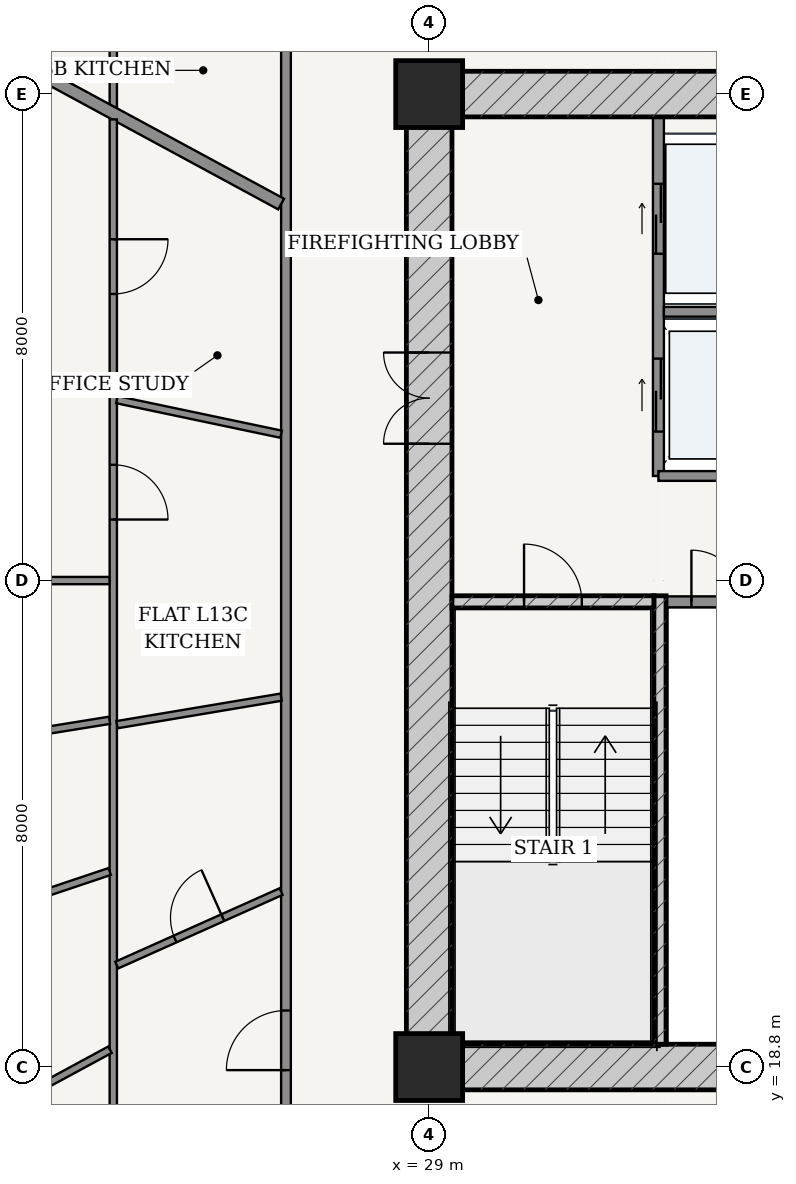
"""IFC4 building model, lengths in metres.
Left out: names, types, materials, properties, quantities, classifications, styles, units other than length and angle.
Written with IfcOpenShell. Run it as: python <this file> out.ifc"""

import sys

from ifc_helpers import new_model, si_unit, direction, frame, frame_2d, origin, origin_2d, place, context, subcontext, project, spatial, rectangle, extrude, source, transform, mapped, element, fill, save


model = new_model("IFC4")
c1 = context("Model", 3, precision=1e-05, world=origin(), true_north=direction((-0.2419218956, 0.970295726276)))
c2 = subcontext(c1, "Body", "Model", "MODEL_VIEW")
j1 = project(units=[si_unit("LENGTHUNIT", "METRE"), si_unit("PLANEANGLEUNIT", "RADIAN")], contexts=[c1])
p1 = place(None, origin())
s1 = spatial("IfcSite", under=j1, at=p1, CompositionType="ELEMENT")
p2 = place(p1, origin())
s2 = spatial("IfcBuilding", under=s1, at=p2, CompositionType="ELEMENT")
p3 = place(p2, frame((0.0, 0.0, 52.8)))
s3 = spatial("IfcBuildingStorey", under=s2, at=p3, CompositionType="ELEMENT", Elevation=52.8)
for number, where, z_axis, x_axis in (
    (1, (29.0, 18.8, 0.0), (0.0, 0.0, 1.0), (1.0, 0.0, 0.0)),
    (2, (29.0, 34.8, 0.0), (0.0, 0.0, 1.0), (1.0, 0.0, 0.0)),
):
    element("IfcColumn", number, at=place(p3, frame(where, z_axis=z_axis, x_axis=x_axis)), inside=s3, PredefinedType="COLUMN", context=c2, shape_type="SweptSolid", body=[
        extrude(rectangle(XDim=1.1, YDim=1.1, at=origin_2d()), origin(), (0.0, 0.0, 1.0), 3.6),
    ])
p4 = place(p3, frame((28.625, 18.8, 0.0), z_axis=(0.0, 0.0, 1.0), x_axis=(1.0, 0.0, 0.0)))
e3 = element("IfcWall", 3, at=p4, inside=s3, PredefinedType="SHEAR", context=c2, shape_type="SweptSolid", body=[
    extrude(rectangle(XDim=18.75, YDim=0.75, at=frame_2d((9.375, 0.0))), origin(), (0.0, 0.0, 1.0), 3.32),
])
p5 = place(p4, frame((7.627, 0.0, 0.0)))
e4 = element("IfcOpeningElement", 4, at=p5, cuts=e3, PredefinedType="OPENING", context=c2, shape_type="SweptSolid", body=[
    extrude(rectangle(XDim=0.85, YDim=2.1, at=frame_2d((0.425, 1.05))), frame((0.0, 0.385, 0.0), z_axis=(0.0, -1.0, 0.0), x_axis=(1.0, 0.0, 0.0)), (0.0, 0.0, 1.0), 0.77),
])
p6 = place(p4, frame((10.673, 0.0, 0.0)))
e5 = element("IfcOpeningElement", 5, at=p6, cuts=e3, PredefinedType="OPENING", context=c2, shape_type="SweptSolid", body=[
    extrude(rectangle(XDim=0.85, YDim=2.1, at=frame_2d((0.425, 1.05))), frame((0.0, 0.385, 0.0), z_axis=(0.0, -1.0, 0.0), x_axis=(1.0, 0.0, 0.0)), (0.0, 0.0, 1.0), 0.77),
])
p7 = place(p3, frame((28.625, 34.8, 0.0), z_axis=(0.0, 0.0, 1.0), x_axis=(1.0, 0.0, 0.0)))
e6 = element("IfcWall", 6, at=p7, inside=s3, PredefinedType="SHEAR", context=c2, shape_type="SweptSolid", body=[
    extrude(rectangle(XDim=18.75, YDim=0.75, at=frame_2d((9.375, 0.0))), origin(), (0.0, 0.0, 1.0), 3.32),
])
p8 = place(p7, frame((6.887, 0.0, 0.0)))
e7 = element("IfcOpeningElement", 7, at=p8, cuts=e6, PredefinedType="OPENING", context=c2, shape_type="SweptSolid", body=[
    extrude(rectangle(XDim=0.85, YDim=2.1, at=frame_2d((0.425, 1.05))), frame((0.0, 0.385, 0.0), z_axis=(0.0, -1.0, 0.0), x_axis=(1.0, 0.0, 0.0)), (0.0, 0.0, 1.0), 0.77),
])
p9 = place(p7, frame((8.945, 0.0, 0.0)))
e8 = element("IfcOpeningElement", 8, at=p9, cuts=e6, PredefinedType="OPENING", context=c2, shape_type="SweptSolid", body=[
    extrude(rectangle(XDim=0.86, YDim=2.1, at=frame_2d((0.43, 1.05))), frame((0.0, 0.385, 0.0), z_axis=(0.0, -1.0, 0.0), x_axis=(1.0, 0.0, 0.0)), (0.0, 0.0, 1.0), 0.77),
])
p10 = place(p7, frame((11.012, 0.0, 0.0)))
e9 = element("IfcOpeningElement", 9, at=p10, cuts=e6, PredefinedType="OPENING", context=c2, shape_type="SweptSolid", body=[
    extrude(rectangle(XDim=0.85, YDim=2.1, at=frame_2d((0.425, 1.05))), frame((0.0, 0.385, 0.0), z_axis=(0.0, -1.0, 0.0), x_axis=(1.0, 0.0, 0.0)), (0.0, 0.0, 1.0), 0.77),
])
p11 = place(p3, frame((29.0, 19.175, 0.0), z_axis=(0.0, 0.0, 1.0), x_axis=(0.0, 1.0, 0.0)))
e10 = element("IfcWall", 10, at=p11, inside=s3, PredefinedType="SHEAR", context=c2, shape_type="SweptSolid", body=[
    extrude(rectangle(XDim=15.25, YDim=0.75, at=frame_2d((7.625, 0.0))), origin(), (0.0, 0.0, 1.0), 3.32),
])
p12 = place(p11, frame((9.875, 0.0, 0.0)))
e11 = element("IfcOpeningElement", 11, at=p12, cuts=e10, PredefinedType="OPENING", context=c2, shape_type="SweptSolid", body=[
    extrude(rectangle(XDim=1.5, YDim=2.2, at=frame_2d((0.75, 1.1))), frame((0.0, 0.385, 0.0), z_axis=(0.0, -1.0, 0.0), x_axis=(1.0, 0.0, 0.0)), (0.0, 0.0, 1.0), 0.77),
])
p13 = place(p3, frame((32.795, 19.175, 0.0), z_axis=(0.0, 0.0, 1.0), x_axis=(0.0, 1.0, 0.0)))
e12 = element("IfcWall", 12, at=p13, inside=s3, PredefinedType="SOLIDWALL", context=c2, shape_type="SweptSolid", body=[
    extrude(rectangle(XDim=7.375, YDim=0.2, at=frame_2d((3.688, 0.0))), origin(), (0.0, 0.0, 1.0), 3.32),
])
p14 = place(p3, frame((29.375, 26.45, 0.0), z_axis=(0.0, 0.0, 1.0), x_axis=(1.0, 0.0, 0.0)))
e13 = element("IfcWall", 13, at=p14, inside=s3, PredefinedType="SOLIDWALL", context=c2, shape_type="SweptSolid", body=[
    extrude(rectangle(XDim=3.32, YDim=0.2, at=frame_2d((1.66, 0.0))), origin(), (0.0, 0.0, 1.0), 3.32),
])
p15 = place(p14, frame((1.185, 0.0, 0.0)))
e14 = element("IfcOpeningElement", 14, at=p15, cuts=e13, PredefinedType="OPENING", context=c2, shape_type="SweptSolid", body=[
    extrude(rectangle(XDim=0.95, YDim=2.15, at=frame_2d((0.475, 1.075))), frame((0.0, 0.11, 0.0), z_axis=(0.0, -1.0, 0.0), x_axis=(1.0, 0.0, 0.0)), (0.0, 0.0, 1.0), 0.22),
])
p16 = place(p3, frame((32.9, 26.45, 0.0), z_axis=(0.0, 0.0, 1.0), x_axis=(1.0, 0.0, 0.0)))
e15 = element("IfcWall", 15, at=p16, inside=s3, PredefinedType="PARTITIONING", context=c2, shape_type="SweptSolid", body=[
    extrude(rectangle(XDim=1.675, YDim=0.18, at=frame_2d((0.837, 0.0))), origin(), (0.0, 0.0, 1.0), 3.32),
])
p17 = place(p16, frame((0.413, 0.0, 0.0)))
e16 = element("IfcOpeningElement", 16, at=p17, cuts=e15, PredefinedType="OPENING", context=c2, shape_type="SweptSolid", body=[
    extrude(rectangle(XDim=0.85, YDim=2.1, at=frame_2d((0.425, 1.05))), frame((0.0, 0.1, 0.0), z_axis=(0.0, -1.0, 0.0), x_axis=(1.0, 0.0, 0.0)), (0.0, 0.0, 1.0), 0.2),
])
p18 = place(p3, frame((32.77, 28.52, 0.0), z_axis=(0.0, 0.0, 1.0), x_axis=(0.0, 1.0, 0.0)))
e17 = element("IfcWall", 17, at=p18, inside=s3, PredefinedType="PARTITIONING", context=c2, shape_type="SweptSolid", body=[
    extrude(rectangle(XDim=5.905, YDim=0.18, at=frame_2d((2.953, 0.0))), origin(), (0.0, 0.0, 1.0), 3.32),
])
p19 = place(p18, frame((3.655, 0.0, 0.0)))
e18 = element("IfcOpeningElement", 18, at=p19, cuts=e17, PredefinedType="OPENING", context=c2, shape_type="SweptSolid", body=[
    extrude(rectangle(XDim=1.15, YDim=2.2, at=frame_2d((0.575, 1.1))), frame((0.0, 0.1, 0.0), z_axis=(0.0, -1.0, 0.0), x_axis=(1.0, 0.0, 0.0)), (0.0, 0.0, 1.0), 0.2),
])
p20 = place(p18, frame((0.73, 0.0, 0.0)))
e19 = element("IfcOpeningElement", 19, at=p20, cuts=e17, PredefinedType="OPENING", context=c2, shape_type="SweptSolid", body=[
    extrude(rectangle(XDim=1.2, YDim=2.25, at=frame_2d((0.6, 1.125))), frame((0.0, 0.1, 0.0), z_axis=(0.0, -1.0, 0.0), x_axis=(1.0, 0.0, 0.0)), (0.0, 0.0, 1.0), 0.2),
])
p21 = place(p3, frame((32.86, 31.22, 0.0), z_axis=(0.0, 0.0, 1.0), x_axis=(1.0, 0.0, 0.0)))
e20 = element("IfcWall", 20, at=p21, inside=s3, PredefinedType="PARTITIONING", context=c2, shape_type="SweptSolid", body=[
    extrude(rectangle(XDim=1.715, YDim=0.16, at=frame_2d((0.857, 0.0))), origin(), (0.0, 0.0, 1.0), 3.32),
])
p22 = place(p3, frame((32.77, 28.52, 0.0), z_axis=(0.0, 0.0, 1.0), x_axis=(1.0, 0.0, 0.0)))
e21 = element("IfcWall", 21, at=p22, inside=s3, PredefinedType="PARTITIONING", context=c2, shape_type="SweptSolid", body=[
    extrude(rectangle(XDim=1.805, YDim=0.16, at=frame_2d((0.902, 0.0))), origin(), (0.0, 0.0, 1.0), 3.32),
])
p23 = place(p3, frame((26.645, 16.525, 0.0), z_axis=(0.0, 0.0, 1.0), x_axis=(0.0, 1.0, 0.0)))
e22 = element("IfcWall", 22, at=p23, inside=s3, PredefinedType="PARTITIONING", context=c2, shape_type="SweptSolid", body=[
    extrude(rectangle(XDim=20.55, YDim=0.16, at=frame_2d((10.275, 0.0))), origin(), (0.0, 0.0, 1.0), 2.688),
])
p24 = place(p23, frame((2.224, 0.0, 0.0)))
e23 = element("IfcOpeningElement", 23, at=p24, cuts=e22, PredefinedType="OPENING", context=c2, shape_type="SweptSolid", body=[
    extrude(rectangle(XDim=0.98, YDim=2.2, at=frame_2d((0.49, 1.1))), frame((0.0, 0.09, 0.0), z_axis=(0.0, -1.0, 0.0), x_axis=(1.0, 0.0, 0.0)), (0.0, 0.0, 1.0), 0.18),
])
p25 = place(p3, frame((23.805, 34.588, 0.0), z_axis=(0.0, 0.0, 1.0), x_axis=(0.0, 1.0, 0.0)))
e24 = element("IfcWall", 24, at=p25, inside=s3, PredefinedType="PARTITIONING", context=c2, shape_type="SweptSolid", body=[
    extrude(rectangle(XDim=5.407, YDim=0.12, at=frame_2d((2.704, 0.0))), origin(), (0.0, 0.0, 1.0), 2.999),
])
p26 = place(p25, frame((2.253, 0.0, 0.0)))
e25 = element("IfcOpeningElement", 25, at=p26, cuts=e24, PredefinedType="OPENING", context=c2, shape_type="SweptSolid", body=[
    extrude(rectangle(XDim=0.9, YDim=2.15, at=frame_2d((0.45, 1.075))), frame((0.0, 0.07, 0.0), z_axis=(0.0, -1.0, 0.0), x_axis=(1.0, 0.0, 0.0)), (0.0, 0.0, 1.0), 0.14),
])
p27 = place(p3, frame((26.565, 32.991, 0.0), z_axis=(0.0, 0.0, 1.0), x_axis=(-0.879369737803, 0.476139542819, 0.0)))
e26 = element("IfcWall", 26, at=p27, inside=s3, PredefinedType="PARTITIONING", context=c2, shape_type="SweptSolid", body=[
    extrude(rectangle(XDim=14.295, YDim=0.2, at=frame_2d((7.147, 0.0))), origin(), (0.0, 0.0, 1.0), 2.688),
])
p28 = place(p3, frame((23.805, 13.605, 0.0), z_axis=(0.0, 0.0, 1.0), x_axis=(0.0, 1.0, 0.0)))
e27 = element("IfcWall", 27, at=p28, inside=s3, PredefinedType="PARTITIONING", context=c2, shape_type="SweptSolid", body=[
    extrude(rectangle(XDim=20.779, YDim=0.12, at=frame_2d((10.39, 0.0))), origin(), (0.0, 0.0, 1.0), 2.688),
])
p29 = place(p28, frame((2.425, 0.0, 0.0)))
e28 = element("IfcOpeningElement", 28, at=p29, cuts=e27, PredefinedType="OPENING", context=c2, shape_type="SweptSolid", body=[
    extrude(rectangle(XDim=0.9, YDim=2.15, at=frame_2d((0.45, 1.075))), frame((0.0, 0.07, 0.0), z_axis=(0.0, -1.0, 0.0), x_axis=(1.0, 0.0, 0.0)), (0.0, 0.0, 1.0), 0.14),
])
p30 = place(p28, frame((14.199, 0.0, 0.0)))
e29 = element("IfcOpeningElement", 29, at=p30, cuts=e27, PredefinedType="OPENING", context=c2, shape_type="SweptSolid", body=[
    extrude(rectangle(XDim=0.9, YDim=2.15, at=frame_2d((0.45, 1.075))), frame((0.0, 0.07, 0.0), z_axis=(0.0, -1.0, 0.0), x_axis=(1.0, 0.0, 0.0)), (0.0, 0.0, 1.0), 0.14),
])
p31 = place(p28, frame((17.908, 0.0, 0.0)))
e30 = element("IfcOpeningElement", 30, at=p31, cuts=e27, PredefinedType="OPENING", context=c2, shape_type="SweptSolid", body=[
    extrude(rectangle(XDim=0.9, YDim=2.15, at=frame_2d((0.45, 1.075))), frame((0.0, 0.07, 0.0), z_axis=(0.0, -1.0, 0.0), x_axis=(1.0, 0.0, 0.0)), (0.0, 0.0, 1.0), 0.14),
])
p32 = place(p3, frame((23.743, 26.8, 0.0), z_axis=(0.0, 0.0, 1.0), x_axis=(-1.0, 0.0, 0.0)))
e31 = element("IfcWall", 31, at=p32, inside=s3, PredefinedType="PARTITIONING", context=c2, shape_type="SweptSolid", body=[
    extrude(rectangle(XDim=14.683, YDim=0.12, at=frame_2d((7.341, 0.0))), origin(), (0.0, 0.0, 1.0), 2.762),
])
p33 = place(p32, frame((6.892, 0.0, 0.0)))
e32 = element("IfcOpeningElement", 32, at=p33, cuts=e31, PredefinedType="OPENING", context=c2, shape_type="SweptSolid", body=[
    extrude(rectangle(XDim=0.9, YDim=2.15, at=frame_2d((0.45, 1.075))), frame((0.0, 0.07, 0.0), z_axis=(0.0, -1.0, 0.0), x_axis=(1.0, 0.0, 0.0)), (0.0, 0.0, 1.0), 0.14),
])
p34 = place(p3, frame((23.744, 24.502, 0.0), z_axis=(0.0, 0.0, 1.0), x_axis=(-0.987259708938, -0.159117149007, 0.0)))
e33 = element("IfcWall", 33, at=p34, inside=s3, PredefinedType="PARTITIONING", context=c2, shape_type="SweptSolid", body=[
    extrude(rectangle(XDim=14.248, YDim=0.12, at=frame_2d((7.124, 0.0))), origin(), (0.0, 0.0, 1.0), 2.688),
])
p35 = place(p34, frame((5.603, 0.0, 0.0)))
e34 = element("IfcOpeningElement", 34, at=p35, cuts=e33, PredefinedType="OPENING", context=c2, shape_type="SweptSolid", body=[
    extrude(rectangle(XDim=0.9, YDim=2.15, at=frame_2d((0.45, 1.075))), frame((0.0, 0.07, 0.0), z_axis=(0.0, -1.0, 0.0), x_axis=(1.0, 0.0, 0.0)), (0.0, 0.0, 1.0), 0.14),
])
p36 = place(p3, frame((23.746, 22.016, 0.0), z_axis=(0.0, 0.0, 1.0), x_axis=(-0.948022802246, -0.318202398516, 0.0)))
e35 = element("IfcWall", 35, at=p36, inside=s3, PredefinedType="PARTITIONING", context=c2, shape_type="SweptSolid", body=[
    extrude(rectangle(XDim=13.163, YDim=0.12, at=frame_2d((6.582, 0.0))), origin(), (0.0, 0.0, 1.0), 2.762),
])
p37 = place(p36, frame((6.131, 0.0, 0.0)))
e36 = element("IfcOpeningElement", 36, at=p37, cuts=e35, PredefinedType="OPENING", context=c2, shape_type="SweptSolid", body=[
    extrude(rectangle(XDim=0.9, YDim=2.15, at=frame_2d((0.45, 1.075))), frame((0.0, 0.07, 0.0), z_axis=(0.0, -1.0, 0.0), x_axis=(1.0, 0.0, 0.0)), (0.0, 0.0, 1.0), 0.14),
])
p38 = place(p3, frame((23.75, 19.084, 0.0), z_axis=(0.0, 0.0, 1.0), x_axis=(-0.879370672984, -0.476137815654, 0.0)))
e37 = element("IfcWall", 37, at=p38, inside=s3, PredefinedType="PARTITIONING", context=c2, shape_type="SweptSolid", body=[
    extrude(rectangle(XDim=11.094, YDim=0.12, at=frame_2d((5.547, 0.0))), origin(), (0.0, 0.0, 1.0), 2.688),
])
p39 = place(p38, frame((4.034, 0.0, 0.0)))
e38 = element("IfcOpeningElement", 38, at=p39, cuts=e37, PredefinedType="OPENING", context=c2, shape_type="SweptSolid", body=[
    extrude(rectangle(XDim=0.9, YDim=2.15, at=frame_2d((0.45, 1.075))), frame((0.0, 0.07, 0.0), z_axis=(0.0, -1.0, 0.0), x_axis=(1.0, 0.0, 0.0)), (0.0, 0.0, 1.0), 0.14),
])
p40 = place(p3, frame((26.565, 29.207, 0.0), z_axis=(0.0, 0.0, 1.0), x_axis=(-0.978560113768, 0.205961413236, 0.0)))
e39 = element("IfcWall", 39, at=p40, inside=s3, PredefinedType="PARTITIONING", context=c2, shape_type="SweptSolid", body=[
    extrude(rectangle(XDim=2.758, YDim=0.12, at=frame_2d((1.379, 0.0))), origin(), (0.0, 0.0, 1.0), 3.32),
])
p41 = place(p3, frame((26.565, 24.883, 0.0), z_axis=(0.0, 0.0, 1.0), x_axis=(-0.986224611599, -0.165411654596, 0.0)))
e40 = element("IfcWall", 40, at=p41, inside=s3, PredefinedType="PARTITIONING", context=c2, shape_type="SweptSolid", body=[
    extrude(rectangle(XDim=2.736, YDim=0.12, at=frame_2d((1.368, 0.0))), origin(), (0.0, 0.0, 1.0), 2.688),
])
p42 = place(p3, frame((26.565, 21.685, 0.0), z_axis=(0.0, 0.0, 1.0), x_axis=(-0.912840085104, -0.408317252914, 0.0)))
e41 = element("IfcWall", 41, at=p42, inside=s3, PredefinedType="PARTITIONING", context=c2, shape_type="SweptSolid", body=[
    extrude(rectangle(XDim=2.961, YDim=0.12, at=frame_2d((1.481, 0.0))), origin(), (0.0, 0.0, 1.0), 3.32),
])
p43 = place(p42, frame((1.051, 0.0, 0.0)))
e42 = element("IfcOpeningElement", 42, at=p43, cuts=e41, PredefinedType="OPENING", context=c2, shape_type="SweptSolid", body=[
    extrude(rectangle(XDim=0.86, YDim=2.15, at=frame_2d((0.43, 1.075))), frame((0.0, 0.07, 0.0), z_axis=(0.0, -1.0, 0.0), x_axis=(1.0, 0.0, 0.0)), (0.0, 0.0, 1.0), 0.14),
])
m1 = source(origin(), c2, "Body", "SweptSolid", [
    extrude(rectangle(XDim=1.5, YDim=2.2, at=frame_2d((0.75, 1.1))), frame((0.0, 0.025, 0.0), z_axis=(0.0, -1.0, 0.0), x_axis=(1.0, 0.0, 0.0)), (0.0, 0.0, 1.0), 0.05),
])
p44 = place(p12, origin())
e43 = element("IfcDoor", 43, at=p44, inside=s3, OperationType="DOUBLE_DOOR_SINGLE_SWING", PredefinedType="DOOR", context=c2, shape_type="MappedRepresentation", body=[
    mapped(m1, transform((0.0, 0.0, 0.0), scale=1.0)),
])
fill(e11, e43)
m2 = source(origin(), c2, "Body", "SweptSolid", [
    extrude(rectangle(XDim=0.95, YDim=2.15, at=frame_2d((0.475, 1.075))), frame((0.0, 0.025, 0.0), z_axis=(0.0, -1.0, 0.0), x_axis=(1.0, 0.0, 0.0)), (0.0, 0.0, 1.0), 0.05),
])
p45 = place(p15, origin())
e44 = element("IfcDoor", 44, at=p45, inside=s3, OperationType="SINGLE_SWING_LEFT", PredefinedType="DOOR", context=c2, shape_type="MappedRepresentation", body=[
    mapped(m2, transform((0.0, 0.0, 0.0), scale=1.0)),
])
fill(e14, e44)
m3 = source(origin(), c2, "Body", "SweptSolid", [
    extrude(rectangle(XDim=0.85, YDim=2.1, at=frame_2d((0.425, 1.05))), frame((0.0, 0.025, 0.0), z_axis=(0.0, -1.0, 0.0), x_axis=(1.0, 0.0, 0.0)), (0.0, 0.0, 1.0), 0.05),
])
p46 = place(p17, origin())
e45 = element("IfcDoor", 45, at=p46, inside=s3, OperationType="SINGLE_SWING_LEFT", PredefinedType="DOOR", context=c2, shape_type="MappedRepresentation", body=[
    mapped(m3, transform((0.0, 0.0, 0.0), scale=1.0)),
])
fill(e16, e45)
m4 = source(origin(), c2, "Body", "SweptSolid", [
    extrude(rectangle(XDim=1.15, YDim=2.2, at=frame_2d((0.575, 1.1))), frame((0.0, 0.025, 0.0), z_axis=(0.0, -1.0, 0.0), x_axis=(1.0, 0.0, 0.0)), (0.0, 0.0, 1.0), 0.05),
])
p47 = place(p19, origin())
e46 = element("IfcDoor", 46, at=p47, inside=s3, OperationType="DOUBLE_DOOR_SLIDING", PredefinedType="DOOR", context=c2, shape_type="MappedRepresentation", body=[
    mapped(m4, transform((0.0, 0.0, 0.0), scale=1.0)),
])
fill(e18, e46)
m5 = source(origin(), c2, "Body", "SweptSolid", [
    extrude(rectangle(XDim=1.2, YDim=2.25, at=frame_2d((0.6, 1.125))), frame((0.0, 0.025, 0.0), z_axis=(0.0, -1.0, 0.0), x_axis=(1.0, 0.0, 0.0)), (0.0, 0.0, 1.0), 0.05),
])
p48 = place(p20, origin())
e47 = element("IfcDoor", 47, at=p48, inside=s3, OperationType="DOUBLE_DOOR_SLIDING", PredefinedType="DOOR", context=c2, shape_type="MappedRepresentation", body=[
    mapped(m5, transform((0.0, 0.0, 0.0), scale=1.0)),
])
fill(e19, e47)
m6 = source(origin(), c2, "Body", "SweptSolid", [
    extrude(rectangle(XDim=0.98, YDim=2.2, at=frame_2d((0.49, 1.1))), frame((0.0, 0.025, 0.0), z_axis=(0.0, -1.0, 0.0), x_axis=(1.0, 0.0, 0.0)), (0.0, 0.0, 1.0), 0.05),
])
p49 = place(p24, origin())
e48 = element("IfcDoor", 48, at=p49, inside=s3, OperationType="SINGLE_SWING_LEFT", PredefinedType="DOOR", context=c2, shape_type="MappedRepresentation", body=[
    mapped(m6, transform((0.0, 0.0, 0.0), scale=1.0)),
])
fill(e23, e48)
m7 = source(origin(), c2, "Body", "SweptSolid", [
    extrude(rectangle(XDim=0.86, YDim=2.15, at=frame_2d((0.43, 1.075))), frame((0.0, 0.025, 0.0), z_axis=(0.0, -1.0, 0.0), x_axis=(1.0, 0.0, 0.0)), (0.0, 0.0, 1.0), 0.05),
])
p50 = place(p43, frame((0.86, 0.0, 0.0), z_axis=(0.0, 0.0, 1.0), x_axis=(-1.0, 0.0, 0.0)))
e49 = element("IfcDoor", 49, at=p50, inside=s3, OperationType="SINGLE_SWING_RIGHT", PredefinedType="DOOR", context=c2, shape_type="MappedRepresentation", body=[
    mapped(m7, transform((0.0, 0.0, 0.0), scale=1.0)),
])
fill(e42, e49)
m8 = source(origin(), c2, "Body", "SweptSolid", [
    extrude(rectangle(XDim=0.9, YDim=2.15, at=frame_2d((0.45, 1.075))), frame((0.0, 0.025, 0.0), z_axis=(0.0, -1.0, 0.0), x_axis=(1.0, 0.0, 0.0)), (0.0, 0.0, 1.0), 0.05),
])
p51 = place(p30, frame((0.9, 0.0, 0.0), z_axis=(0.0, 0.0, 1.0), x_axis=(-1.0, 0.0, 0.0)))
e50 = element("IfcDoor", 50, at=p51, inside=s3, OperationType="SINGLE_SWING_RIGHT", PredefinedType="DOOR", context=c2, shape_type="MappedRepresentation", body=[
    mapped(m8, transform((0.0, 0.0, 0.0), scale=1.0)),
])
fill(e29, e50)
p52 = place(p31, frame((0.9, 0.0, 0.0), z_axis=(0.0, 0.0, 1.0), x_axis=(-1.0, 0.0, 0.0)))
e51 = element("IfcDoor", 51, at=p52, inside=s3, OperationType="SINGLE_SWING_LEFT", PredefinedType="DOOR", context=c2, shape_type="MappedRepresentation", body=[
    mapped(m8, transform((0.0, 0.0, 0.0), scale=1.0)),
])
fill(e30, e51)
save(model, sys.argv[1])
